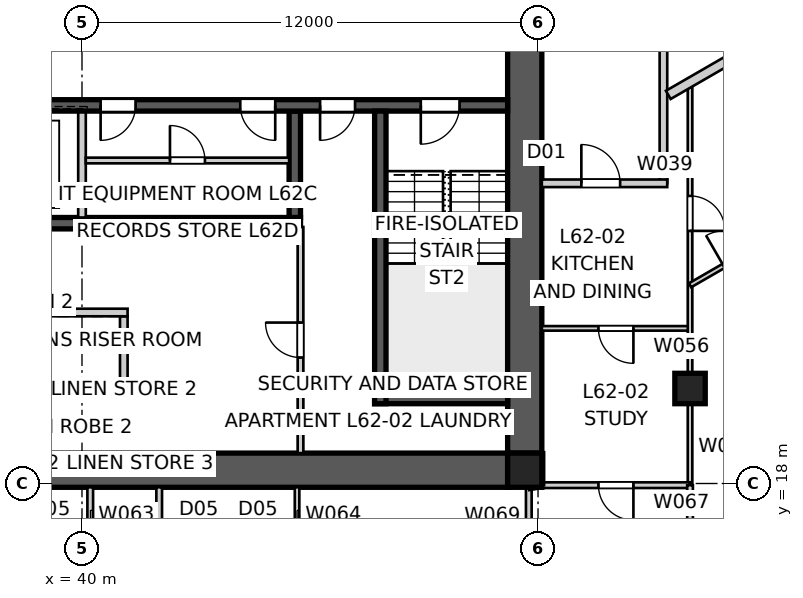
"""IFC4 building model, lengths in metres.
Left out: names, types, materials, properties, quantities, classifications, styles, units other than length and angle.
Written with IfcOpenShell. Run it as: python <this file> out.ifc"""

import sys

from ifc_helpers import new_model, si_unit, direction, frame, frame_2d, origin, origin_2d, place, context, subcontext, project, spatial, polyline, rectangle, outline, extrude, element, fill, save


model = new_model("IFC4")
c1 = context("Model", 3, precision=1e-05, world=origin(), true_north=direction((0.0, 1.0)))
c2 = subcontext(c1, "Body", "Model", "MODEL_VIEW")
j1 = project(units=[si_unit("LENGTHUNIT", "METRE"), si_unit("PLANEANGLEUNIT", "RADIAN")], contexts=[c1])
p1 = place(None, origin())
s1 = spatial("IfcSite", under=j1, at=p1, CompositionType="ELEMENT")
p2 = place(p1, origin())
s2 = spatial("IfcBuilding", under=s1, at=p2, CompositionType="ELEMENT")
p3 = place(p2, frame((0.0, 0.0, 225.2)))
s3 = spatial("IfcBuildingStorey", under=s2, at=p3, CompositionType="ELEMENT", Elevation=225.2)
p4 = place(p3, frame((51.2, 18.35, 0.0), z_axis=(0.0, 0.0, 1.0), x_axis=(-1.0, 0.0, 0.0)))
e1 = element("IfcWall", 1, at=p4, inside=s3, PredefinedType="SHEAR", context=c2, shape_type="SweptSolid", body=[
    extrude(outline(polyline([(0.0, -0.45), (22.4, -0.45), (22.4, -0.025), (22.85, -0.025), (22.85, 0.025), (22.4, 0.025), (22.4, 0.45), (0.0, 0.45), (0.0, 0.025), (-0.45, 0.025), (-0.45, -0.025), (0.0, -0.025), (0.0, -0.45)])), origin(), (0.0, 0.0, 1.0), 3.4),
])
p5 = place(p3, frame((51.65, 18.8, 0.0), z_axis=(0.0, 0.0, 1.0), x_axis=(0.0, 1.0, 0.0)))
e2 = element("IfcWall", 2, at=p5, inside=s3, PredefinedType="SHEAR", context=c2, shape_type="SweptSolid", body=[
    extrude(outline(polyline([(0.0, -0.45), (22.4, -0.45), (22.4, -0.025), (22.85, -0.025), (22.85, 0.025), (22.4, 0.025), (22.4, 0.45), (0.0, 0.45), (0.0, 0.025), (-0.45, 0.025), (-0.45, -0.025), (0.0, -0.025), (0.0, -0.45)])), origin(), (0.0, 0.0, 1.0), 3.4),
])
p6 = place(p5, frame((11.14, 0.0, 0.0)))
e3 = element("IfcOpeningElement", 3, at=p6, cuts=e2, PredefinedType="OPENING", context=c2, shape_type="SweptSolid", body=[
    extrude(rectangle(XDim=1.02, YDim=2.4, at=frame_2d((0.51, 1.2))), frame((0.0, 0.46, 0.0), z_axis=(0.0, -1.0, 0.0), x_axis=(1.0, 0.0, 0.0)), (0.0, 0.0, 1.0), 0.92),
])
p7 = place(p3, frame((51.2, 27.95, 0.0), z_axis=(0.0, 0.0, 1.0), x_axis=(-1.0, 0.0, 0.0)))
e4 = element("IfcWall", 4, at=p7, inside=s3, PredefinedType="SHEAR", context=c2, shape_type="SweptSolid", body=[
    extrude(rectangle(XDim=22.4, YDim=0.3, at=frame_2d((11.2, 0.0))), origin(), (0.0, 0.0, 1.0), 3.4),
])
p8 = place(p7, frame((19.04, 0.0, 0.0)))
e5 = element("IfcOpeningElement", 5, at=p8, cuts=e4, PredefinedType="OPENING", context=c2, shape_type="SweptSolid", body=[
    extrude(rectangle(XDim=0.92, YDim=2.1, at=frame_2d((0.46, 1.05))), frame((0.0, 0.16, 0.0), z_axis=(0.0, -1.0, 0.0), x_axis=(1.0, 0.0, 0.0)), (0.0, 0.0, 1.0), 0.32),
])
p9 = place(p7, frame((1.265, 0.0, 0.0)))
e6 = element("IfcOpeningElement", 6, at=p9, cuts=e4, PredefinedType="OPENING", context=c2, shape_type="SweptSolid", body=[
    extrude(rectangle(XDim=1.02, YDim=2.1, at=frame_2d((0.51, 1.05))), frame((0.0, 0.16, 0.0), z_axis=(0.0, -1.0, 0.0), x_axis=(1.0, 0.0, 0.0)), (0.0, 0.0, 1.0), 0.32),
])
p10 = place(p7, frame((4.015, 0.0, 0.0)))
e7 = element("IfcOpeningElement", 7, at=p10, cuts=e4, PredefinedType="OPENING", context=c2, shape_type="SweptSolid", body=[
    extrude(rectangle(XDim=0.92, YDim=2.1, at=frame_2d((0.46, 1.05))), frame((0.0, 0.16, 0.0), z_axis=(0.0, -1.0, 0.0), x_axis=(1.0, 0.0, 0.0)), (0.0, 0.0, 1.0), 0.32),
])
p11 = place(p7, frame((9.79, 0.0, 0.0)))
e8 = element("IfcOpeningElement", 8, at=p11, cuts=e4, PredefinedType="OPENING", context=c2, shape_type="SweptSolid", body=[
    extrude(rectangle(XDim=0.92, YDim=2.1, at=frame_2d((0.46, 1.05))), frame((0.0, 0.16, 0.0), z_axis=(0.0, -1.0, 0.0), x_axis=(1.0, 0.0, 0.0)), (0.0, 0.0, 1.0), 0.32),
])
p12 = place(p7, frame((6.115, 0.0, 0.0)))
e9 = element("IfcOpeningElement", 9, at=p12, cuts=e4, PredefinedType="OPENING", context=c2, shape_type="SweptSolid", body=[
    extrude(rectangle(XDim=0.92, YDim=2.1, at=frame_2d((0.46, 1.05))), frame((0.0, 0.16, 0.0), z_axis=(0.0, -1.0, 0.0), x_axis=(1.0, 0.0, 0.0)), (0.0, 0.0, 1.0), 0.32),
])
p13 = place(p7, frame((12.05, 0.0, 0.0)))
e10 = element("IfcOpeningElement", 10, at=p13, cuts=e4, PredefinedType="OPENING", context=c2, shape_type="SweptSolid", body=[
    extrude(rectangle(XDim=1.1, YDim=2.1, at=frame_2d((0.55, 1.05))), frame((0.0, 0.16, 0.0), z_axis=(0.0, -1.0, 0.0), x_axis=(1.0, 0.0, 0.0)), (0.0, 0.0, 1.0), 0.32),
])
p14 = place(p7, frame((14.85, 0.0, 0.0)))
e11 = element("IfcOpeningElement", 11, at=p14, cuts=e4, PredefinedType="OPENING", context=c2, shape_type="SweptSolid", body=[
    extrude(rectangle(XDim=1.1, YDim=2.1, at=frame_2d((0.55, 1.05))), frame((0.0, 0.16, 0.0), z_axis=(0.0, -1.0, 0.0), x_axis=(1.0, 0.0, 0.0)), (0.0, 0.0, 1.0), 0.32),
])
p15 = place(p3, frame((45.75, 24.85, 0.0), z_axis=(0.0, 0.0, 1.0), x_axis=(-1.0, 0.0, 0.0)))
e12 = element("IfcWall", 12, at=p15, inside=s3, PredefinedType="SHEAR", context=c2, shape_type="SweptSolid", body=[
    extrude(rectangle(XDim=11.5, YDim=0.3, at=frame_2d((5.75, 0.0))), origin(), (0.0, 0.0, 1.0), 3.4),
])
p16 = place(p3, frame((45.6, 27.8, 0.0), z_axis=(0.0, 0.0, 1.0), x_axis=(0.0, -1.0, 0.0)))
e13 = element("IfcWall", 13, at=p16, inside=s3, PredefinedType="SHEAR", context=c2, shape_type="SweptSolid", body=[
    extrude(rectangle(XDim=2.8, YDim=0.3, at=frame_2d((1.4, 0.0))), origin(), (0.0, 0.0, 1.0), 3.4),
])
p17 = place(p3, frame((40.0, 27.8, 0.0), z_axis=(0.0, 0.0, 1.0), x_axis=(0.0, -1.0, 0.0)))
e14 = element("IfcWall", 14, at=p17, inside=s3, PredefinedType="SOLIDWALL", context=c2, shape_type="SweptSolid", body=[
    extrude(rectangle(XDim=2.8, YDim=0.2, at=frame_2d((1.4, 0.0))), origin(), (0.0, 0.0, 1.0), 3.4),
])
p18 = place(p3, frame((47.85, 27.8, 0.0), z_axis=(0.0, 0.0, 1.0), x_axis=(0.0, -1.0, 0.0)))
e15 = element("IfcWall", 15, at=p18, inside=s3, PredefinedType="SHEAR", context=c2, shape_type="SweptSolid", body=[
    extrude(rectangle(XDim=7.7, YDim=0.3, at=frame_2d((3.85, 0.0))), origin(), (0.0, 0.0, 1.0), 3.4),
])
p19 = place(p3, frame((51.2, 20.25, 0.0), z_axis=(0.0, 0.0, 1.0), x_axis=(-1.0, 0.0, 0.0)))
e16 = element("IfcWall", 16, at=p19, inside=s3, PredefinedType="SHEAR", context=c2, shape_type="SweptSolid", body=[
    extrude(rectangle(XDim=3.5, YDim=0.3, at=frame_2d((1.75, 0.0))), origin(), (0.0, 0.0, 1.0), 3.4),
])
p20 = place(p3, frame((41.1, 22.4, 0.0), z_axis=(0.0, 0.0, 1.0), x_axis=(0.0, -1.0, 0.0)))
e17 = element("IfcWall", 17, at=p20, inside=s3, PredefinedType="SOLIDWALL", context=c2, shape_type="SweptSolid", body=[
    extrude(rectangle(XDim=2.0, YDim=0.2, at=frame_2d((1.0, 0.0))), origin(), (0.0, 0.0, 1.0), 3.4),
])
for number, where, z_axis, x_axis in (
    (18, (38.8, 22.5, 0.0), (0.0, 0.0, 1.0), (1.0, 0.0, 0.0)),
    (19, (38.8, 20.3, 0.0), (0.0, 0.0, 1.0), (1.0, 0.0, 0.0)),
):
    element("IfcWall", number, at=place(p3, frame(where, z_axis=z_axis, x_axis=x_axis)), inside=s3, PredefinedType="SOLIDWALL", context=c2, shape_type="SweptSolid", body=[
        extrude(rectangle(XDim=2.4, YDim=0.2, at=frame_2d((1.2, 0.0))), origin(), (0.0, 0.0, 1.0), 3.4),
    ])
p21 = place(p3, frame((51.65, 18.35, 0.0), z_axis=(0.0, 0.0, 1.0), x_axis=(1.0, 0.0, 0.0)))
e20 = element("IfcColumn", 20, at=p21, inside=s3, PredefinedType="COLUMN", context=c2, shape_type="SweptSolid", body=[
    extrude(rectangle(XDim=0.9, YDim=0.9, at=origin_2d()), origin(), (0.0, 0.0, 1.0), 3.4),
])
p22 = place(p3, frame((56.0, 20.5, 0.0), z_axis=(0.0, 0.0, 1.0), x_axis=(1.0, 0.0, 0.0)))
e21 = element("IfcColumn", 21, at=p22, inside=s3, PredefinedType="COLUMN", context=c2, shape_type="SweptSolid", body=[
    extrude(rectangle(XDim=0.8, YDim=0.8, at=origin_2d()), origin(), (0.0, 0.0, 1.0), 3.4),
])
p23 = place(p3, frame((55.3, 25.9, 0.0), z_axis=(0.0, 0.0, 1.0), x_axis=(0.0, 1.0, 0.0)))
e22 = element("IfcWall", 22, at=p23, inside=s3, PredefinedType="PARTITIONING", context=c2, shape_type="SweptSolid", body=[
    extrude(rectangle(XDim=8.2, YDim=0.2, at=frame_2d((4.1, 0.0))), origin(), (0.0, 0.0, 1.0), 3.25),
])
p24 = place(p3, frame((52.1, 25.9, 0.0), z_axis=(0.0, 0.0, 1.0), x_axis=(1.0, 0.0, 0.0)))
e23 = element("IfcWall", 23, at=p24, inside=s3, PredefinedType="PARTITIONING", context=c2, shape_type="SweptSolid", body=[
    extrude(rectangle(XDim=3.3, YDim=0.2, at=frame_2d((1.65, 0.0))), origin(), (0.0, 0.0, 1.0), 3.25),
])
p25 = place(p24, frame((1.04, 0.0, 0.0)))
e24 = element("IfcOpeningElement", 24, at=p25, cuts=e23, PredefinedType="OPENING", context=c2, shape_type="SweptSolid", body=[
    extrude(rectangle(XDim=1.02, YDim=2.34, at=frame_2d((0.51, 1.17))), frame((0.0, 0.11, 0.0), z_axis=(0.0, -1.0, 0.0), x_axis=(1.0, 0.0, 0.0)), (0.0, 0.0, 1.0), 0.22),
])
p26 = place(p3, frame((64.111, 33.239, 0.0), z_axis=(0.0, 0.0, 1.0), x_axis=(-0.866024190901, -0.50000210077, 0.0)))
e25 = element("IfcWall", 25, at=p26, inside=s3, PredefinedType="PARTITIONING", context=c2, shape_type="SweptSolid", body=[
    extrude(rectangle(XDim=10.026, YDim=0.25, at=frame_2d((5.013, 0.0))), origin(), (0.0, 0.0, 1.0), 3.25),
])
p27 = place(p26, frame((2.229, 0.0, 0.0)))
e26 = element("IfcOpeningElement", 26, at=p27, cuts=e25, PredefinedType="OPENING", context=c2, shape_type="SweptSolid", body=[
    extrude(rectangle(XDim=0.92, YDim=2.34, at=frame_2d((0.46, 1.17))), frame((0.0, 0.135, 0.0), z_axis=(0.0, -1.0, 0.0), x_axis=(1.0, 0.0, 0.0)), (0.0, 0.0, 1.0), 0.27),
])
p28 = place(p3, frame((45.75, 18.8, 0.0), z_axis=(0.0, 0.0, 1.0), x_axis=(0.0, 1.0, 0.0)))
e27 = element("IfcWall", 27, at=p28, inside=s3, PredefinedType="SOLIDWALL", context=c2, shape_type="SweptSolid", body=[
    extrude(rectangle(XDim=5.95, YDim=0.15, at=frame_2d((2.975, 0.0))), origin(), (0.0, 0.0, 1.0), 3.25),
])
p29 = place(p28, frame((2.515, 0.0, 0.0)))
e28 = element("IfcOpeningElement", 28, at=p29, cuts=e27, PredefinedType="OPENING", context=c2, shape_type="SweptSolid", body=[
    extrude(rectangle(XDim=0.92, YDim=2.1, at=frame_2d((0.46, 1.05))), frame((0.0, 0.085, 0.0), z_axis=(0.0, -1.0, 0.0), x_axis=(1.0, 0.0, 0.0)), (0.0, 0.0, 1.0), 0.17),
])
p30 = place(p3, frame((56.0, 22.083, 0.0), z_axis=(0.0, 0.0, 1.0), x_axis=(-1.0, 0.0, 0.0)))
e29 = element("IfcWall", 29, at=p30, inside=s3, PredefinedType="PARTITIONING", context=c2, shape_type="SweptSolid", body=[
    extrude(rectangle(XDim=3.9, YDim=0.12, at=frame_2d((1.95, 0.0))), origin(), (0.0, 0.0, 1.0), 3.25),
])
p31 = place(p30, frame((1.49, 0.0, 0.0)))
e30 = element("IfcOpeningElement", 30, at=p31, cuts=e29, PredefinedType="OPENING", context=c2, shape_type="SweptSolid", body=[
    extrude(rectangle(XDim=0.92, YDim=2.34, at=frame_2d((0.46, 1.17))), frame((0.0, 0.07, 0.0), z_axis=(0.0, -1.0, 0.0), x_axis=(1.0, 0.0, 0.0)), (0.0, 0.0, 1.0), 0.14),
])
p32 = place(p3, frame((56.0, 28.557, 0.0), z_axis=(0.0, 0.0, 1.0), x_axis=(0.0, -1.0, 0.0)))
e31 = element("IfcWall", 31, at=p32, inside=s3, PredefinedType="PARTITIONING", context=c2, shape_type="SweptSolid", body=[
    extrude(rectangle(XDim=10.601, YDim=0.12, at=frame_2d((5.3, 0.0))), origin(), (0.0, 0.0, 1.0), 2.55),
])
p33 = place(p32, frame((2.989, 0.0, 0.0)))
e32 = element("IfcOpeningElement", 32, at=p33, cuts=e31, PredefinedType="OPENING", context=c2, shape_type="SweptSolid", body=[
    extrude(rectangle(XDim=0.92, YDim=2.34, at=frame_2d((0.46, 1.17))), frame((0.0, 0.07, 0.0), z_axis=(0.0, -1.0, 0.0), x_axis=(1.0, 0.0, 0.0)), (0.0, 0.0, 1.0), 0.14),
])
p34 = place(p3, frame((40.217, 17.9, 0.0), z_axis=(0.0, 0.0, 1.0), x_axis=(0.0, -1.0, 0.0)))
e33 = element("IfcWall", 33, at=p34, inside=s3, PredefinedType="SOLIDWALL", context=c2, shape_type="SweptSolid", body=[
    extrude(rectangle(XDim=3.9, YDim=0.15, at=frame_2d((1.95, 0.0))), origin(), (0.0, 0.0, 1.0), 3.25),
])
p35 = place(p34, frame((1.47, 0.0, 0.0)))
e34 = element("IfcOpeningElement", 34, at=p35, cuts=e33, PredefinedType="OPENING", context=c2, shape_type="SweptSolid", body=[
    extrude(rectangle(XDim=0.96, YDim=2.1, at=frame_2d((0.48, 1.05))), frame((0.0, 0.085, 0.0), z_axis=(0.0, -1.0, 0.0), x_axis=(1.0, 0.0, 0.0)), (0.0, 0.0, 1.0), 0.17),
])
p36 = place(p3, frame((45.659, 17.9, 0.0), z_axis=(0.0, 0.0, 1.0), x_axis=(0.0, -1.0, 0.0)))
e35 = element("IfcWall", 35, at=p36, inside=s3, PredefinedType="PARTITIONING", context=c2, shape_type="SweptSolid", body=[
    extrude(rectangle(XDim=3.9, YDim=0.12, at=frame_2d((1.95, 0.0))), origin(), (0.0, 0.0, 1.0), 3.25),
])
p37 = place(p36, frame((1.47, 0.0, 0.0)))
e36 = element("IfcOpeningElement", 36, at=p37, cuts=e35, PredefinedType="OPENING", context=c2, shape_type="SweptSolid", body=[
    extrude(rectangle(XDim=0.96, YDim=2.1, at=frame_2d((0.48, 1.05))), frame((0.0, 0.07, 0.0), z_axis=(0.0, -1.0, 0.0), x_axis=(1.0, 0.0, 0.0)), (0.0, 0.0, 1.0), 0.14),
])
p38 = place(p3, frame((42.031, 14.0, 0.0), z_axis=(0.0, 0.0, 1.0), x_axis=(0.0, 1.0, 0.0)))
e37 = element("IfcWall", 37, at=p38, inside=s3, PredefinedType="SOLIDWALL", context=c2, shape_type="SweptSolid", body=[
    extrude(rectangle(XDim=3.9, YDim=0.15, at=frame_2d((1.95, 0.0))), origin(), (0.0, 0.0, 1.0), 3.25),
])
p39 = place(p38, frame((1.47, 0.0, 0.0)))
e38 = element("IfcOpeningElement", 38, at=p39, cuts=e37, PredefinedType="OPENING", context=c2, shape_type="SweptSolid", body=[
    extrude(rectangle(XDim=0.96, YDim=2.1, at=frame_2d((0.48, 1.05))), frame((0.0, 0.085, 0.0), z_axis=(0.0, -1.0, 0.0), x_axis=(1.0, 0.0, 0.0)), (0.0, 0.0, 1.0), 0.17),
])
p40 = place(p3, frame((56.0, 17.956, 0.0), z_axis=(0.0, 0.0, 1.0), x_axis=(-1.0, 0.0, 0.0)))
e39 = element("IfcWall", 39, at=p40, inside=s3, PredefinedType="SOLIDWALL", context=c2, shape_type="SweptSolid", body=[
    extrude(rectangle(XDim=3.9, YDim=0.15, at=frame_2d((1.95, 0.0))), origin(), (0.0, 0.0, 1.0), 3.25),
])
p41 = place(p40, frame((1.49, 0.0, 0.0)))
e40 = element("IfcOpeningElement", 40, at=p41, cuts=e39, PredefinedType="OPENING", context=c2, shape_type="SweptSolid", body=[
    extrude(rectangle(XDim=0.92, YDim=2.1, at=frame_2d((0.46, 1.05))), frame((0.0, 0.085, 0.0), z_axis=(0.0, -1.0, 0.0), x_axis=(1.0, 0.0, 0.0)), (0.0, 0.0, 1.0), 0.17),
])
p42 = place(p3, frame((52.1, 17.956, 0.0), z_axis=(0.0, 0.0, 1.0), x_axis=(0.0, 1.0, 0.0)))
e41 = element("IfcWall", 41, at=p42, inside=s3, PredefinedType="PARTITIONING", context=c2, shape_type="SweptSolid", body=[
    extrude(rectangle(XDim=0.864, YDim=0.12, at=frame_2d((0.432, 0.0))), origin(), (0.0, 0.0, 1.0), 3.25),
])
p43 = place(p3, frame((51.757, 14.0, 0.0), z_axis=(0.0, 0.0, 1.0), x_axis=(0.0, 1.0, 0.0)))
e42 = element("IfcWall", 42, at=p43, inside=s3, PredefinedType="SOLIDWALL", context=c2, shape_type="SweptSolid", body=[
    extrude(rectangle(XDim=3.9, YDim=0.15, at=frame_2d((1.95, 0.0))), origin(), (0.0, 0.0, 1.0), 3.25),
])
p44 = place(p43, frame((1.49, 0.0, 0.0)))
e43 = element("IfcOpeningElement", 43, at=p44, cuts=e42, PredefinedType="OPENING", context=c2, shape_type="SweptSolid", body=[
    extrude(rectangle(XDim=0.92, YDim=2.1, at=frame_2d((0.46, 1.05))), frame((0.0, 0.085, 0.0), z_axis=(0.0, -1.0, 0.0), x_axis=(1.0, 0.0, 0.0)), (0.0, 0.0, 1.0), 0.17),
])
p45 = place(p3, frame((56.0, 17.956, 0.0), z_axis=(0.0, 0.0, 1.0), x_axis=(0.0, -1.0, 0.0)))
e44 = element("IfcWall", 44, at=p45, inside=s3, PredefinedType="SOLIDWALL", context=c2, shape_type="SweptSolid", body=[
    extrude(rectangle(XDim=3.956, YDim=0.15, at=frame_2d((1.978, 0.0))), origin(), (0.0, 0.0, 1.0), 3.25),
])
p46 = place(p3, frame((56.0, 23.216, 0.0), z_axis=(0.0, 0.0, 1.0), x_axis=(0.866023917076, 0.500002575046, 0.0)))
e45 = element("IfcWall", 45, at=p46, inside=s3, PredefinedType="PARTITIONING", context=c2, shape_type="SweptSolid", body=[
    extrude(rectangle(XDim=11.996, YDim=0.12, at=frame_2d((5.998, 0.0))), origin(), (0.0, 0.0, 1.0), 3.25),
])
p47 = place(p46, frame((4.574, 0.0, 0.0)))
e46 = element("IfcOpeningElement", 46, at=p47, cuts=e45, PredefinedType="OPENING", context=c2, shape_type="SweptSolid", body=[
    extrude(rectangle(XDim=0.92, YDim=2.34, at=frame_2d((0.46, 1.17))), frame((0.0, 0.07, 0.0), z_axis=(0.0, -1.0, 0.0), x_axis=(1.0, 0.0, 0.0)), (0.0, 0.0, 1.0), 0.14),
])
p48 = place(p46, frame((1.02, 0.0, 0.0)))
e47 = element("IfcOpeningElement", 47, at=p48, cuts=e45, PredefinedType="OPENING", context=c2, shape_type="SweptSolid", body=[
    extrude(rectangle(XDim=0.92, YDim=2.34, at=frame_2d((0.46, 1.17))), frame((0.0, 0.07, 0.0), z_axis=(0.0, -1.0, 0.0), x_axis=(1.0, 0.0, 0.0)), (0.0, 0.0, 1.0), 0.14),
])
p49 = place(p46, frame((9.394, 0.0, 0.0)))
e48 = element("IfcOpeningElement", 48, at=p49, cuts=e45, PredefinedType="OPENING", context=c2, shape_type="SweptSolid", body=[
    extrude(rectangle(XDim=0.92, YDim=2.34, at=frame_2d((0.46, 1.17))), frame((0.0, 0.07, 0.0), z_axis=(0.0, -1.0, 0.0), x_axis=(1.0, 0.0, 0.0)), (0.0, 0.0, 1.0), 0.14),
])
p50 = place(p3, frame((51.757, 17.9, 0.0), z_axis=(0.0, 0.0, 1.0), x_axis=(0.986864404584, 0.161550756622, 0.0)))
e49 = element("IfcWall", 49, at=p50, inside=s3, PredefinedType="SOLIDWALL", context=c2, shape_type="SweptSolid", body=[
    extrude(rectangle(XDim=0.348, YDim=0.15, at=frame_2d((0.174, 0.0))), origin(), (0.0, 0.0, 1.0), 3.25),
])
p51 = place(p3, frame((40.1, 26.5, 0.0), z_axis=(0.0, 0.0, 1.0), x_axis=(1.0, 0.0, 0.0)))
e50 = element("IfcWall", 50, at=p51, inside=s3, PredefinedType="SOLIDWALL", context=c2, shape_type="SweptSolid", body=[
    extrude(rectangle(XDim=5.35, YDim=0.15, at=frame_2d((2.675, 0.0))), origin(), (0.0, 0.0, 1.0), 3.25),
])
p52 = place(p51, frame((2.215, 0.0, 0.0)))
e51 = element("IfcOpeningElement", 51, at=p52, cuts=e50, PredefinedType="OPENING", context=c2, shape_type="SweptSolid", body=[
    extrude(rectangle(XDim=0.92, YDim=2.1, at=frame_2d((0.46, 1.05))), frame((0.0, 0.085, 0.0), z_axis=(0.0, -1.0, 0.0), x_axis=(1.0, 0.0, 0.0)), (0.0, 0.0, 1.0), 0.17),
])
p53 = place(p9, origin())
e52 = element("IfcDoor", 52, at=p53, inside=s3, OperationType="SINGLE_SWING_RIGHT", PredefinedType="DOOR", context=c2, shape_type="SweptSolid", body=[
    extrude(rectangle(XDim=1.02, YDim=2.1, at=frame_2d((0.51, 1.05))), frame((0.0, 0.025, 0.0), z_axis=(0.0, -1.0, 0.0), x_axis=(1.0, 0.0, 0.0)), (0.0, 0.0, 1.0), 0.05),
])
fill(e6, e52)
p54 = place(p10, origin())
e53 = element("IfcDoor", 53, at=p54, inside=s3, OperationType="SINGLE_SWING_RIGHT", PredefinedType="DOOR", context=c2, shape_type="SweptSolid", body=[
    extrude(rectangle(XDim=0.92, YDim=2.1, at=frame_2d((0.46, 1.05))), frame((0.0, 0.025, 0.0), z_axis=(0.0, -1.0, 0.0), x_axis=(1.0, 0.0, 0.0)), (0.0, 0.0, 1.0), 0.05),
])
fill(e7, e53)
p55 = place(p25, origin())
e54 = element("IfcDoor", 54, at=p55, inside=s3, OperationType="SINGLE_SWING_LEFT", PredefinedType="DOOR", context=c2, shape_type="SweptSolid", body=[
    extrude(rectangle(XDim=1.02, YDim=2.34, at=frame_2d((0.51, 1.17))), frame((0.0, 0.025, 0.0), z_axis=(0.0, -1.0, 0.0), x_axis=(1.0, 0.0, 0.0)), (0.0, 0.0, 1.0), 0.05),
])
fill(e24, e54)
p56 = place(p29, origin())
e55 = element("IfcDoor", 55, at=p56, inside=s3, OperationType="SINGLE_SWING_RIGHT", PredefinedType="DOOR", context=c2, shape_type="SweptSolid", body=[
    extrude(rectangle(XDim=0.92, YDim=2.1, at=frame_2d((0.46, 1.05))), frame((0.0, 0.025, 0.0), z_axis=(0.0, -1.0, 0.0), x_axis=(1.0, 0.0, 0.0)), (0.0, 0.0, 1.0), 0.05),
])
fill(e28, e55)
p57 = place(p33, origin())
e56 = element("IfcDoor", 56, at=p57, inside=s3, OperationType="SINGLE_SWING_RIGHT", PredefinedType="DOOR", context=c2, shape_type="SweptSolid", body=[
    extrude(rectangle(XDim=0.92, YDim=2.34, at=frame_2d((0.46, 1.17))), frame((0.0, 0.025, 0.0), z_axis=(0.0, -1.0, 0.0), x_axis=(1.0, 0.0, 0.0)), (0.0, 0.0, 1.0), 0.05),
])
fill(e32, e56)
p58 = place(p31, origin())
e57 = element("IfcDoor", 57, at=p58, inside=s3, OperationType="SINGLE_SWING_LEFT", PredefinedType="DOOR", context=c2, shape_type="SweptSolid", body=[
    extrude(rectangle(XDim=0.92, YDim=2.34, at=frame_2d((0.46, 1.17))), frame((0.0, 0.025, 0.0), z_axis=(0.0, -1.0, 0.0), x_axis=(1.0, 0.0, 0.0)), (0.0, 0.0, 1.0), 0.05),
])
fill(e30, e57)
p59 = place(p48, origin())
e58 = element("IfcDoor", 58, at=p59, inside=s3, OperationType="SINGLE_SWING_LEFT", PredefinedType="DOOR", context=c2, shape_type="SweptSolid", body=[
    extrude(rectangle(XDim=0.92, YDim=2.34, at=frame_2d((0.46, 1.17))), frame((0.0, 0.025, 0.0), z_axis=(0.0, -1.0, 0.0), x_axis=(1.0, 0.0, 0.0)), (0.0, 0.0, 1.0), 0.05),
])
fill(e47, e58)
p60 = place(p41, origin())
e59 = element("IfcDoor", 59, at=p60, inside=s3, OperationType="SINGLE_SWING_LEFT", PredefinedType="DOOR", context=c2, shape_type="SweptSolid", body=[
    extrude(rectangle(XDim=0.92, YDim=2.1, at=frame_2d((0.46, 1.05))), frame((0.0, 0.025, 0.0), z_axis=(0.0, -1.0, 0.0), x_axis=(1.0, 0.0, 0.0)), (0.0, 0.0, 1.0), 0.05),
])
fill(e40, e59)
p61 = place(p11, origin())
e60 = element("IfcDoor", 60, at=p61, inside=s3, OperationType="SINGLE_SWING_RIGHT", PredefinedType="DOOR", context=c2, shape_type="SweptSolid", body=[
    extrude(rectangle(XDim=0.92, YDim=2.1, at=frame_2d((0.46, 1.05))), frame((0.0, 0.025, 0.0), z_axis=(0.0, -1.0, 0.0), x_axis=(1.0, 0.0, 0.0)), (0.0, 0.0, 1.0), 0.05),
])
fill(e8, e60)
p62 = place(p12, origin())
e61 = element("IfcDoor", 61, at=p62, inside=s3, OperationType="SINGLE_SWING_LEFT", PredefinedType="DOOR", context=c2, shape_type="SweptSolid", body=[
    extrude(rectangle(XDim=0.92, YDim=2.1, at=frame_2d((0.46, 1.05))), frame((0.0, 0.025, 0.0), z_axis=(0.0, -1.0, 0.0), x_axis=(1.0, 0.0, 0.0)), (0.0, 0.0, 1.0), 0.05),
])
fill(e9, e61)
p63 = place(p52, origin())
e62 = element("IfcDoor", 62, at=p63, inside=s3, OperationType="SINGLE_SWING_LEFT", PredefinedType="DOOR", context=c2, shape_type="SweptSolid", body=[
    extrude(rectangle(XDim=0.92, YDim=2.1, at=frame_2d((0.46, 1.05))), frame((0.0, 0.025, 0.0), z_axis=(0.0, -1.0, 0.0), x_axis=(1.0, 0.0, 0.0)), (0.0, 0.0, 1.0), 0.05),
])
fill(e51, e62)
save(model, sys.argv[1])
